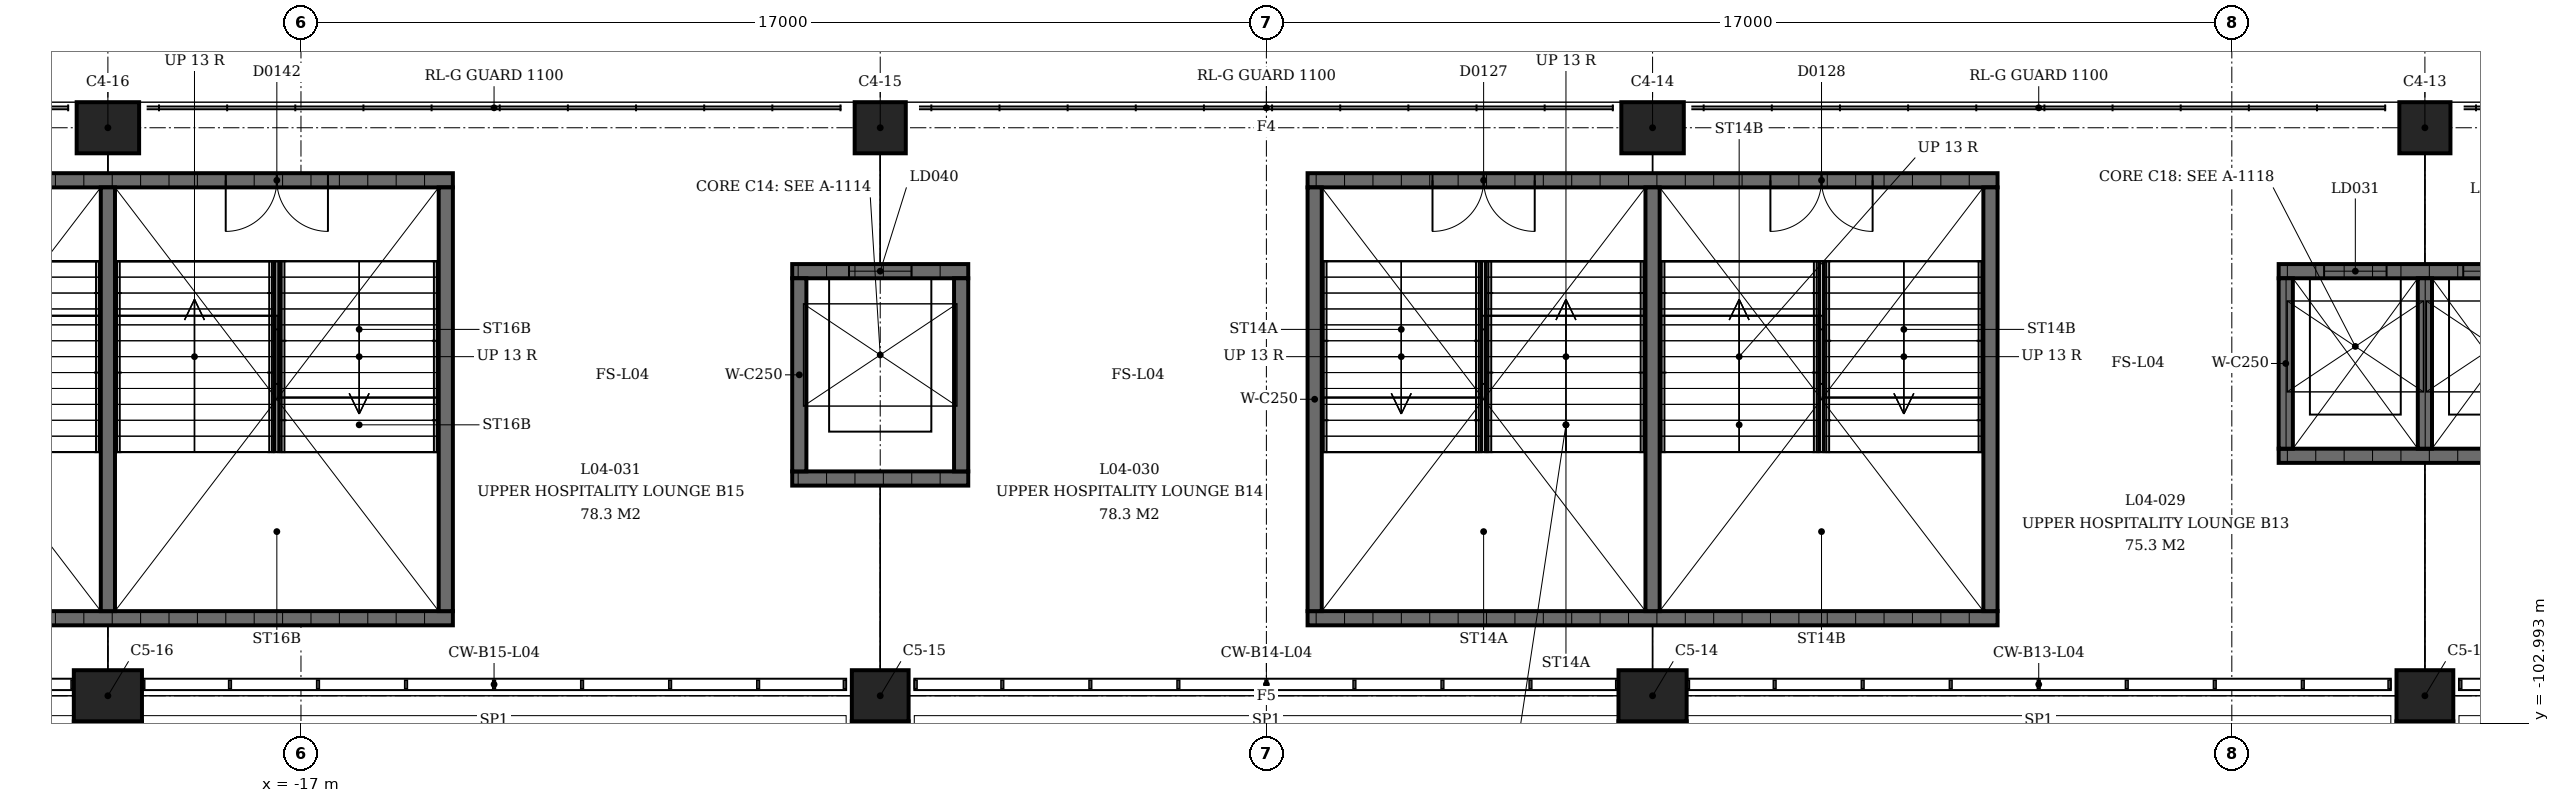
"""IFC4 building model, lengths in metres.
Left out: names, types, materials, properties, quantities, classifications, styles, units other than length and angle.
Written with IfcOpenShell. Run it as: python <this file> out.ifc"""

import sys

from ifc_helpers import new_model, si_unit, direction, frame, frame_2d, origin, origin_2d, place, context, subcontext, project, spatial, rectangle, extrude, element, fill, save


model = new_model("IFC4")
c1 = context("Model", 3, precision=1e-05, world=origin(), true_north=direction((0.0, 1.0)))
c2 = subcontext(c1, "Body", "Model", "MODEL_VIEW")
j1 = project(units=[si_unit("LENGTHUNIT", "METRE"), si_unit("PLANEANGLEUNIT", "RADIAN")], contexts=[c1])
p1 = place(None, origin())
s1 = spatial("IfcSite", under=j1, at=p1, CompositionType="ELEMENT")
p2 = place(p1, origin())
s2 = spatial("IfcBuilding", under=s1, at=p2, CompositionType="ELEMENT")
p3 = place(p2, frame((0.0, 0.0, 18.0)))
s3 = spatial("IfcBuildingStorey", under=s2, at=p3, CompositionType="ELEMENT", Elevation=18.0)
p4 = place(p3, frame((20.4, -92.5, 0.0), z_axis=(0.0, 0.0, 1.0), x_axis=(1.0, 0.0, 0.0)))
e1 = element("IfcColumn", 1, at=p4, inside=s3, PredefinedType="COLUMN", context=c2, shape_type="SweptSolid", body=[
    extrude(rectangle(XDim=0.9, YDim=0.9, at=origin_2d()), origin(), (0.0, 0.0, 1.0), 4.5),
])
p5 = place(p3, frame((20.4, -102.5, 0.0), z_axis=(0.0, 0.0, 1.0), x_axis=(1.0, 0.0, 0.0)))
e2 = element("IfcColumn", 2, at=p5, inside=s3, PredefinedType="COLUMN", context=c2, shape_type="SweptSolid", body=[
    extrude(rectangle(XDim=1.0, YDim=0.9, at=origin_2d()), origin(), (0.0, 0.0, 1.0), 4.5),
])
p6 = place(p3, frame((6.8, -92.5, 0.0), z_axis=(0.0, 0.0, 1.0), x_axis=(1.0, 0.0, 0.0)))
e3 = element("IfcColumn", 3, at=p6, inside=s3, PredefinedType="COLUMN", context=c2, shape_type="SweptSolid", body=[
    extrude(rectangle(XDim=1.1, YDim=0.9, at=origin_2d()), origin(), (0.0, 0.0, 1.0), 4.5),
])
p7 = place(p3, frame((6.8, -102.5, 0.0), z_axis=(0.0, 0.0, 1.0), x_axis=(1.0, 0.0, 0.0)))
e4 = element("IfcColumn", 4, at=p7, inside=s3, PredefinedType="COLUMN", context=c2, shape_type="SweptSolid", body=[
    extrude(rectangle(XDim=1.2, YDim=0.9, at=origin_2d()), origin(), (0.0, 0.0, 1.0), 4.5),
])
p8 = place(p3, frame((-6.8, -92.5, 0.0), z_axis=(0.0, 0.0, 1.0), x_axis=(1.0, 0.0, 0.0)))
e5 = element("IfcColumn", 5, at=p8, inside=s3, PredefinedType="COLUMN", context=c2, shape_type="SweptSolid", body=[
    extrude(rectangle(XDim=0.9, YDim=0.9, at=origin_2d()), origin(), (0.0, 0.0, 1.0), 4.5),
])
p9 = place(p3, frame((-6.8, -102.5, 0.0), z_axis=(0.0, 0.0, 1.0), x_axis=(1.0, 0.0, 0.0)))
e6 = element("IfcColumn", 6, at=p9, inside=s3, PredefinedType="COLUMN", context=c2, shape_type="SweptSolid", body=[
    extrude(rectangle(XDim=1.0, YDim=0.9, at=origin_2d()), origin(), (0.0, 0.0, 1.0), 4.5),
])
p10 = place(p3, frame((-20.4, -92.5, 0.0), z_axis=(0.0, 0.0, 1.0), x_axis=(1.0, 0.0, 0.0)))
e7 = element("IfcColumn", 7, at=p10, inside=s3, PredefinedType="COLUMN", context=c2, shape_type="SweptSolid", body=[
    extrude(rectangle(XDim=1.1, YDim=0.9, at=origin_2d()), origin(), (0.0, 0.0, 1.0), 4.5),
])
p11 = place(p3, frame((-20.4, -102.5, 0.0), z_axis=(0.0, 0.0, 1.0), x_axis=(1.0, 0.0, 0.0)))
e8 = element("IfcColumn", 8, at=p11, inside=s3, PredefinedType="COLUMN", context=c2, shape_type="SweptSolid", body=[
    extrude(rectangle(XDim=1.2, YDim=0.9, at=origin_2d()), origin(), (0.0, 0.0, 1.0), 4.5),
])
p12 = place(p3, frame((0.725, -93.425, 0.0), z_axis=(0.0, 0.0, 1.0), x_axis=(1.0, 0.0, 0.0)))
e9 = element("IfcWall", 9, at=p12, inside=s3, PredefinedType="SHEAR", context=c2, shape_type="SweptSolid", body=[
    extrude(rectangle(XDim=12.15, YDim=0.25, at=frame_2d((6.075, 0.0))), origin(), (0.0, 0.0, 1.0), 4.09),
])
p13 = place(p12, frame((2.2, 0.0, 0.0)))
e10 = element("IfcOpeningElement", 10, at=p13, cuts=e9, PredefinedType="OPENING", context=c2, shape_type="SweptSolid", body=[
    extrude(rectangle(XDim=1.8, YDim=2.1, at=frame_2d((0.9, 1.05))), frame((0.0, 0.125, 0.0), z_axis=(0.0, -1.0, 0.0), x_axis=(1.0, 0.0, 0.0)), (0.0, 0.0, 1.0), 0.25),
])
p14 = place(p12, frame((8.15, 0.0, 0.0)))
e11 = element("IfcOpeningElement", 11, at=p14, cuts=e9, PredefinedType="OPENING", context=c2, shape_type="SweptSolid", body=[
    extrude(rectangle(XDim=1.8, YDim=2.1, at=frame_2d((0.9, 1.05))), frame((0.0, 0.125, 0.0), z_axis=(0.0, -1.0, 0.0), x_axis=(1.0, 0.0, 0.0)), (0.0, 0.0, 1.0), 0.25),
])
p15 = place(p3, frame((0.725, -101.135, 0.0), z_axis=(0.0, 0.0, 1.0), x_axis=(1.0, 0.0, 0.0)))
e12 = element("IfcWall", 12, at=p15, inside=s3, PredefinedType="SHEAR", context=c2, shape_type="SweptSolid", body=[
    extrude(rectangle(XDim=12.15, YDim=0.25, at=frame_2d((6.075, 0.0))), origin(), (0.0, 0.0, 1.0), 4.09),
])
for number, where, z_axis, x_axis in (
    (13, (0.85, -93.55, 0.0), (0.0, 0.0, 1.0), (0.0, -1.0, 0.0)),
    (14, (12.75, -93.55, 0.0), (0.0, 0.0, 1.0), (0.0, -1.0, 0.0)),
    (15, (6.8, -93.55, 0.0), (0.0, 0.0, 1.0), (0.0, -1.0, 0.0)),
):
    element("IfcWall", number, at=place(p3, frame(where, z_axis=z_axis, x_axis=x_axis)), inside=s3, PredefinedType="SHEAR", context=c2, shape_type="SweptSolid", body=[
        extrude(rectangle(XDim=7.46, YDim=0.25, at=frame_2d((3.73, 0.0))), origin(), (0.0, 0.0, 1.0), 4.09),
    ])
p16 = place(p3, frame((-26.475, -93.425, 0.0), z_axis=(0.0, 0.0, 1.0), x_axis=(1.0, 0.0, 0.0)))
e16 = element("IfcWall", 16, at=p16, inside=s3, PredefinedType="SHEAR", context=c2, shape_type="SweptSolid", body=[
    extrude(rectangle(XDim=12.15, YDim=0.25, at=frame_2d((6.075, 0.0))), origin(), (0.0, 0.0, 1.0), 4.09),
])
p17 = place(p16, frame((2.2, 0.0, 0.0)))
e17 = element("IfcOpeningElement", 17, at=p17, cuts=e16, PredefinedType="OPENING", context=c2, shape_type="SweptSolid", body=[
    extrude(rectangle(XDim=1.8, YDim=2.1, at=frame_2d((0.9, 1.05))), frame((0.0, 0.125, 0.0), z_axis=(0.0, -1.0, 0.0), x_axis=(1.0, 0.0, 0.0)), (0.0, 0.0, 1.0), 0.25),
])
p18 = place(p16, frame((8.15, 0.0, 0.0)))
e18 = element("IfcOpeningElement", 18, at=p18, cuts=e16, PredefinedType="OPENING", context=c2, shape_type="SweptSolid", body=[
    extrude(rectangle(XDim=1.8, YDim=2.1, at=frame_2d((0.9, 1.05))), frame((0.0, 0.125, 0.0), z_axis=(0.0, -1.0, 0.0), x_axis=(1.0, 0.0, 0.0)), (0.0, 0.0, 1.0), 0.25),
])
p19 = place(p3, frame((-26.475, -101.135, 0.0), z_axis=(0.0, 0.0, 1.0), x_axis=(1.0, 0.0, 0.0)))
e19 = element("IfcWall", 19, at=p19, inside=s3, PredefinedType="SHEAR", context=c2, shape_type="SweptSolid", body=[
    extrude(rectangle(XDim=12.15, YDim=0.25, at=frame_2d((6.075, 0.0))), origin(), (0.0, 0.0, 1.0), 4.09),
])
for number, where, z_axis, x_axis in (
    (20, (-14.45, -93.55, 0.0), (0.0, 0.0, 1.0), (0.0, -1.0, 0.0)),
    (21, (-20.4, -93.55, 0.0), (0.0, 0.0, 1.0), (0.0, -1.0, 0.0)),
):
    element("IfcWall", number, at=place(p3, frame(where, z_axis=z_axis, x_axis=x_axis)), inside=s3, PredefinedType="SHEAR", context=c2, shape_type="SweptSolid", body=[
        extrude(rectangle(XDim=7.46, YDim=0.25, at=frame_2d((3.73, 0.0))), origin(), (0.0, 0.0, 1.0), 4.09),
    ])
p20 = place(p3, frame((17.825, -95.025, 0.0), z_axis=(0.0, 0.0, 1.0), x_axis=(1.0, 0.0, 0.0)))
e22 = element("IfcWall", 22, at=p20, inside=s3, PredefinedType="SHEAR", context=c2, shape_type="SweptSolid", body=[
    extrude(rectangle(XDim=5.15, YDim=0.25, at=frame_2d((2.575, 0.0))), origin(), (0.0, 0.0, 1.0), 4.09),
])
p21 = place(p20, frame((0.8, 0.0, 0.0)))
e23 = element("IfcOpeningElement", 23, at=p21, cuts=e22, PredefinedType="OPENING", context=c2, shape_type="SweptSolid", body=[
    extrude(rectangle(XDim=1.1, YDim=2.1, at=frame_2d((0.55, 1.05))), frame((0.0, 0.125, 0.0), z_axis=(0.0, -1.0, 0.0), x_axis=(1.0, 0.0, 0.0)), (0.0, 0.0, 1.0), 0.25),
])
p22 = place(p20, frame((3.25, 0.0, 0.0)))
e24 = element("IfcOpeningElement", 24, at=p22, cuts=e22, PredefinedType="OPENING", context=c2, shape_type="SweptSolid", body=[
    extrude(rectangle(XDim=1.1, YDim=2.1, at=frame_2d((0.55, 1.05))), frame((0.0, 0.125, 0.0), z_axis=(0.0, -1.0, 0.0), x_axis=(1.0, 0.0, 0.0)), (0.0, 0.0, 1.0), 0.25),
])
p23 = place(p3, frame((17.825, -98.275, 0.0), z_axis=(0.0, 0.0, 1.0), x_axis=(1.0, 0.0, 0.0)))
e25 = element("IfcWall", 25, at=p23, inside=s3, PredefinedType="SHEAR", context=c2, shape_type="SweptSolid", body=[
    extrude(rectangle(XDim=5.15, YDim=0.25, at=frame_2d((2.575, 0.0))), origin(), (0.0, 0.0, 1.0), 4.09),
])
for number, where, z_axis, x_axis in (
    (26, (17.95, -95.15, 0.0), (0.0, 0.0, 1.0), (0.0, -1.0, 0.0)),
    (27, (20.4, -95.15, 0.0), (0.0, 0.0, 1.0), (0.0, -1.0, 0.0)),
):
    element("IfcWall", number, at=place(p3, frame(where, z_axis=z_axis, x_axis=x_axis)), inside=s3, PredefinedType="SHEAR", context=c2, shape_type="SweptSolid", body=[
        extrude(rectangle(XDim=3.0, YDim=0.25, at=frame_2d((1.5, 0.0))), origin(), (0.0, 0.0, 1.0), 4.09),
    ])
p24 = place(p3, frame((-8.35, -95.025, 0.0), z_axis=(0.0, 0.0, 1.0), x_axis=(1.0, 0.0, 0.0)))
e28 = element("IfcWall", 28, at=p24, inside=s3, PredefinedType="SHEAR", context=c2, shape_type="SweptSolid", body=[
    extrude(rectangle(XDim=3.1, YDim=0.25, at=frame_2d((1.55, 0.0))), origin(), (0.0, 0.0, 1.0), 4.09),
])
p25 = place(p24, frame((1.0, 0.0, 0.0)))
e29 = element("IfcOpeningElement", 29, at=p25, cuts=e28, PredefinedType="OPENING", context=c2, shape_type="SweptSolid", body=[
    extrude(rectangle(XDim=1.1, YDim=2.1, at=frame_2d((0.55, 1.05))), frame((0.0, 0.125, 0.0), z_axis=(0.0, -1.0, 0.0), x_axis=(1.0, 0.0, 0.0)), (0.0, 0.0, 1.0), 0.25),
])
p26 = place(p3, frame((-8.35, -98.675, 0.0), z_axis=(0.0, 0.0, 1.0), x_axis=(1.0, 0.0, 0.0)))
e30 = element("IfcWall", 30, at=p26, inside=s3, PredefinedType="SHEAR", context=c2, shape_type="SweptSolid", body=[
    extrude(rectangle(XDim=3.1, YDim=0.25, at=frame_2d((1.55, 0.0))), origin(), (0.0, 0.0, 1.0), 4.09),
])
for number, where, z_axis, x_axis in (
    (31, (-8.225, -95.15, 0.0), (0.0, 0.0, 1.0), (0.0, -1.0, 0.0)),
    (32, (-5.375, -95.15, 0.0), (0.0, 0.0, 1.0), (0.0, -1.0, 0.0)),
):
    element("IfcWall", number, at=place(p3, frame(where, z_axis=z_axis, x_axis=x_axis)), inside=s3, PredefinedType="SHEAR", context=c2, shape_type="SweptSolid", body=[
        extrude(rectangle(XDim=3.4, YDim=0.25, at=frame_2d((1.7, 0.0))), origin(), (0.0, 0.0, 1.0), 4.09),
    ])
p27 = place(p13, origin())
e33 = element("IfcDoor", 33, at=p27, inside=s3, OperationType="DOUBLE_DOOR_SINGLE_SWING", PredefinedType="DOOR", context=c2, shape_type="SweptSolid", body=[
    extrude(rectangle(XDim=1.8, YDim=2.1, at=frame_2d((0.9, 1.05))), frame((0.0, 0.025, 0.0), z_axis=(0.0, -1.0, 0.0), x_axis=(1.0, 0.0, 0.0)), (0.0, 0.0, 1.0), 0.05),
])
fill(e10, e33)
p28 = place(p14, origin())
e34 = element("IfcDoor", 34, at=p28, inside=s3, OperationType="DOUBLE_DOOR_SINGLE_SWING", PredefinedType="DOOR", context=c2, shape_type="SweptSolid", body=[
    extrude(rectangle(XDim=1.8, YDim=2.1, at=frame_2d((0.9, 1.05))), frame((0.0, 0.025, 0.0), z_axis=(0.0, -1.0, 0.0), x_axis=(1.0, 0.0, 0.0)), (0.0, 0.0, 1.0), 0.05),
])
fill(e11, e34)
p29 = place(p18, origin())
e35 = element("IfcDoor", 35, at=p29, inside=s3, OperationType="DOUBLE_DOOR_SINGLE_SWING", PredefinedType="DOOR", context=c2, shape_type="SweptSolid", body=[
    extrude(rectangle(XDim=1.8, YDim=2.1, at=frame_2d((0.9, 1.05))), frame((0.0, 0.025, 0.0), z_axis=(0.0, -1.0, 0.0), x_axis=(1.0, 0.0, 0.0)), (0.0, 0.0, 1.0), 0.05),
])
fill(e18, e35)
p30 = place(p21, origin())
e36 = element("IfcDoor", 36, at=p30, inside=s3, OperationType="SLIDING_TO_LEFT", PredefinedType="DOOR", context=c2, shape_type="SweptSolid", body=[
    extrude(rectangle(XDim=1.1, YDim=2.1, at=frame_2d((0.55, 1.05))), frame((0.0, 0.025, 0.0), z_axis=(0.0, -1.0, 0.0), x_axis=(1.0, 0.0, 0.0)), (0.0, 0.0, 1.0), 0.05),
])
fill(e23, e36)
p31 = place(p22, origin())
e37 = element("IfcDoor", 37, at=p31, inside=s3, OperationType="SLIDING_TO_LEFT", PredefinedType="DOOR", context=c2, shape_type="SweptSolid", body=[
    extrude(rectangle(XDim=1.1, YDim=2.1, at=frame_2d((0.55, 1.05))), frame((0.0, 0.025, 0.0), z_axis=(0.0, -1.0, 0.0), x_axis=(1.0, 0.0, 0.0)), (0.0, 0.0, 1.0), 0.05),
])
fill(e24, e37)
p32 = place(p25, origin())
e38 = element("IfcDoor", 38, at=p32, inside=s3, OperationType="SLIDING_TO_LEFT", PredefinedType="DOOR", context=c2, shape_type="SweptSolid", body=[
    extrude(rectangle(XDim=1.1, YDim=2.1, at=frame_2d((0.55, 1.05))), frame((0.0, 0.025, 0.0), z_axis=(0.0, -1.0, 0.0), x_axis=(1.0, 0.0, 0.0)), (0.0, 0.0, 1.0), 0.05),
])
fill(e29, e38)
save(model, sys.argv[1])
